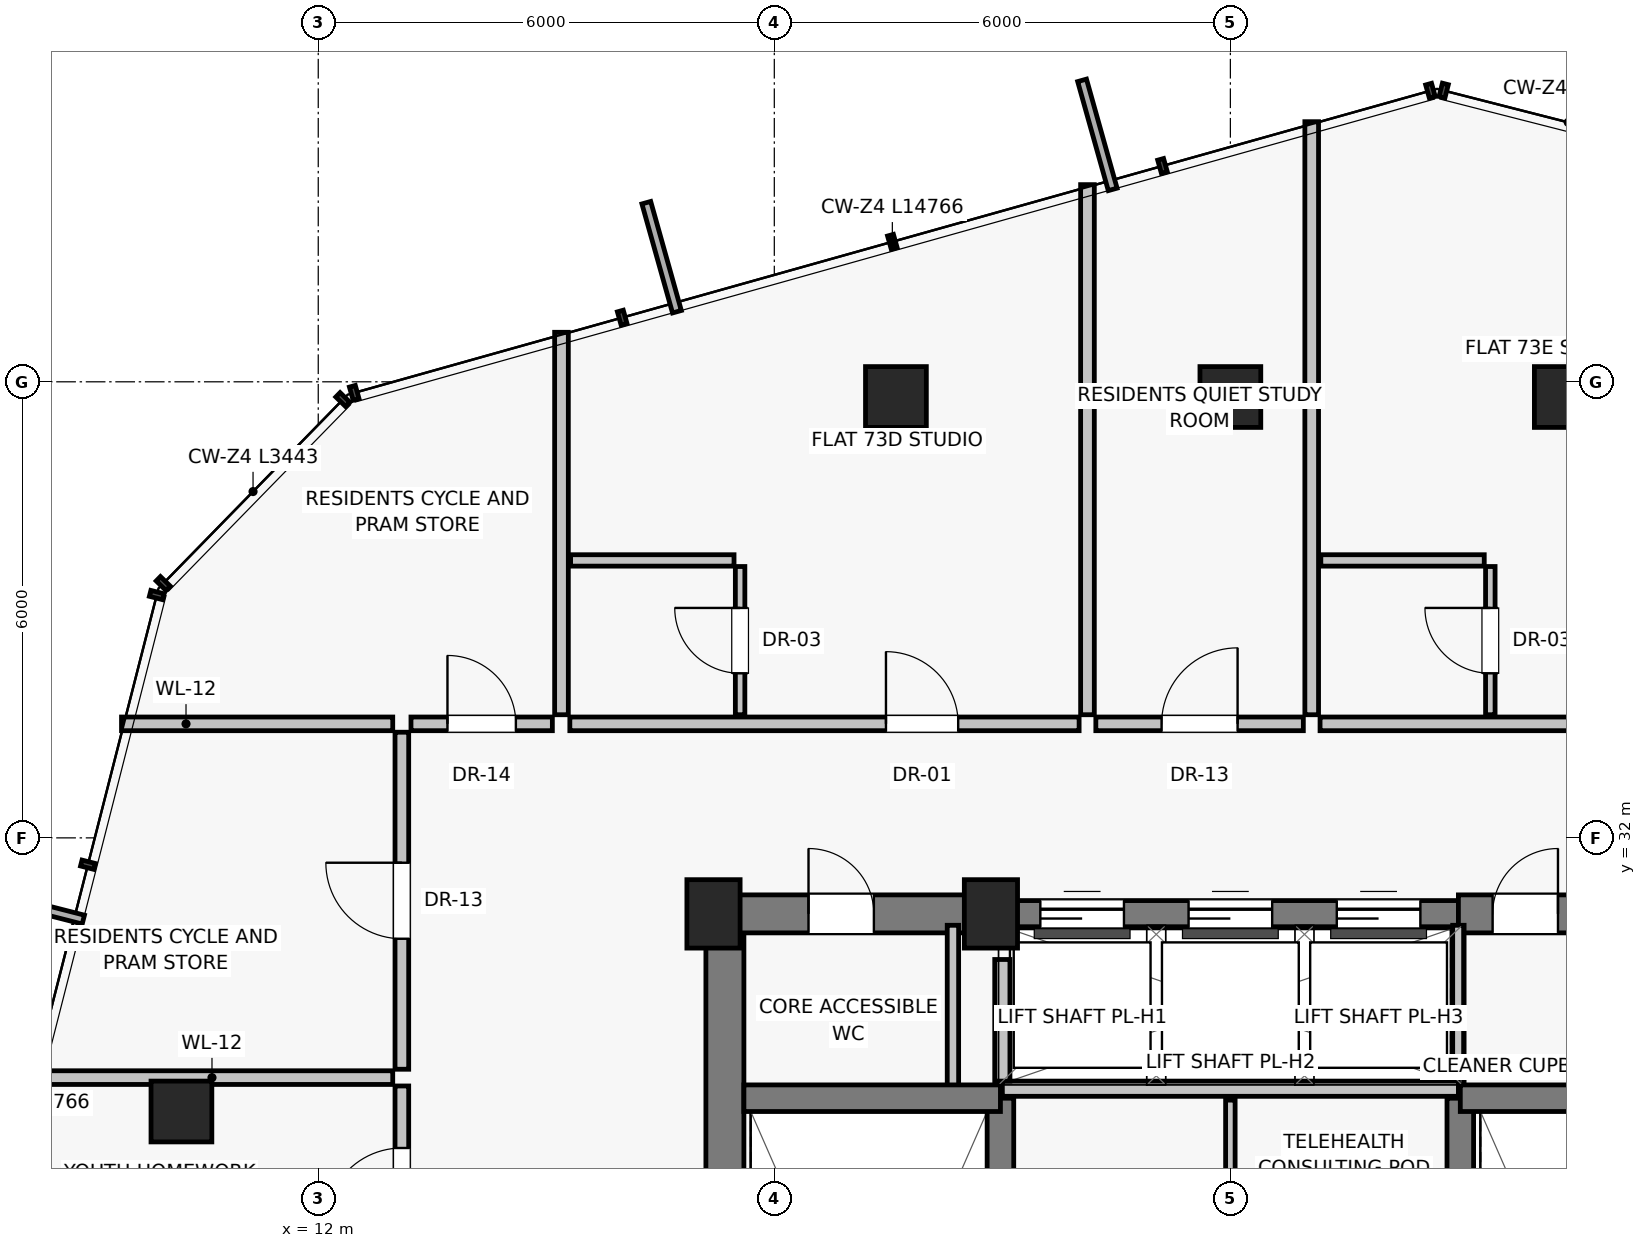
"""IFC4 building model, lengths in metres.
Left out: names, types, materials, properties, quantities, classifications, styles, units other than length and angle.
Written with IfcOpenShell. Run it as: python <this file> out.ifc"""

import sys

from ifc_helpers import new_model, si_unit, direction, frame, frame_2d, origin, origin_2d, place, context, subcontext, project, spatial, rectangle, extrude, source, transform, mapped, element, fill, save


model = new_model("IFC4")
c1 = context("Model", 3, precision=1e-05, world=origin(), true_north=direction((0.0, 1.0)))
c2 = subcontext(c1, "Body", "Model", "MODEL_VIEW")
j1 = project(units=[si_unit("LENGTHUNIT", "METRE"), si_unit("PLANEANGLEUNIT", "RADIAN")], contexts=[c1])
p1 = place(None, origin())
s1 = spatial("IfcSite", under=j1, at=p1, CompositionType="ELEMENT")
p2 = place(p1, origin())
s2 = spatial("IfcBuilding", under=s1, at=p2, CompositionType="ELEMENT")
p3 = place(p2, frame((0.0, 0.0, 257.75)))
s3 = spatial("IfcBuildingStorey", under=s2, at=p3, CompositionType="ELEMENT", Elevation=257.75)
for number, where, z_axis, x_axis in (
    (1, (17.2, 31.0, 0.0), (0.0, 0.0, 1.0), (1.0, 0.0, 0.0)),
    (2, (20.85, 31.0, 0.0), (0.0, 0.0, 1.0), (1.0, 0.0, 0.0)),
):
    element("IfcColumn", number, at=place(p3, frame(where, z_axis=z_axis, x_axis=x_axis)), inside=s3, PredefinedType="PILASTER", context=c2, shape_type="SweptSolid", body=[
        extrude(rectangle(XDim=0.7, YDim=0.9, at=origin_2d()), origin(), (0.0, 0.0, 1.0), 3.25),
    ])
for number, where, z_axis, x_axis in (
    (3, (28.4, 37.8, 0.0), (0.0, 0.0, 1.0), (1.0, 0.0, 0.0)),
    (4, (24.0, 37.8, 0.0), (0.0, 0.0, 1.0), (1.0, 0.0, 0.0)),
    (5, (19.6, 37.8, 0.0), (0.0, 0.0, 1.0), (1.0, 0.0, 0.0)),
    (6, (10.2, 28.4, 0.0), (0.0, 0.0, 1.0), (1.0, 0.0, 0.0)),
):
    element("IfcColumn", number, at=place(p3, frame(where, z_axis=z_axis, x_axis=x_axis)), inside=s3, PredefinedType="COLUMN", context=c2, shape_type="SweptSolid", body=[
        extrude(rectangle(XDim=0.8, YDim=0.8, at=origin_2d()), origin(), (0.0, 0.0, 1.0), 3.25),
    ])
p4 = place(p3, frame((17.35, 16.8, 0.0), z_axis=(0.0, 0.0, 1.0), x_axis=(0.0, 1.0, 0.0)))
e7 = element("IfcWall", 7, at=p4, inside=s3, PredefinedType="SHEAR", context=c2, shape_type="SweptSolid", body=[
    extrude(rectangle(XDim=14.2, YDim=0.5, at=frame_2d((7.1, 0.0))), origin(), (0.0, 0.0, 1.0), 3.015),
])
p5 = place(p3, frame((17.2, 31.0, 0.0), z_axis=(0.0, 0.0, 1.0), x_axis=(1.0, 0.0, 0.0)))
e8 = element("IfcWall", 8, at=p5, inside=s3, PredefinedType="SHEAR", context=c2, shape_type="SweptSolid", body=[
    extrude(rectangle(XDim=3.8, YDim=0.5, at=frame_2d((1.9, 0.0))), origin(), (0.0, 0.0, 1.0), 3.015),
])
p6 = place(p5, frame((1.25, 0.0, 0.0)))
e9 = element("IfcOpeningElement", 9, at=p6, cuts=e8, PredefinedType="OPENING", context=c2, shape_type="SweptSolid", body=[
    extrude(rectangle(XDim=0.86, YDim=2.01, at=frame_2d((0.43, 1.005))), frame((0.0, 0.26, 0.0), z_axis=(0.0, -1.0, 0.0), x_axis=(1.0, 0.0, 0.0)), (0.0, 0.0, 1.0), 0.52),
])
p7 = place(p3, frame((21.0, 31.0, 0.0), z_axis=(0.0, 0.0, 1.0), x_axis=(1.0, 0.0, 0.0)))
e10 = element("IfcWall", 10, at=p7, inside=s3, PredefinedType="SHEAR", context=c2, shape_type="SweptSolid", body=[
    extrude(rectangle(XDim=6.0, YDim=0.35, at=frame_2d((3.0, 0.0))), origin(), (0.0, 0.0, 1.0), 3.015),
])
p8 = place(p7, frame((0.5, 0.0, 0.0)))
e11 = element("IfcOpeningElement", 11, at=p8, cuts=e10, PredefinedType="OPENING", context=c2, shape_type="SweptSolid", body=[
    extrude(rectangle(XDim=1.1, YDim=2.08, at=frame_2d((0.55, 1.04))), frame((0.0, 0.185, 0.0), z_axis=(0.0, -1.0, 0.0), x_axis=(1.0, 0.0, 0.0)), (0.0, 0.0, 1.0), 0.37),
])
p9 = place(p7, frame((2.45, 0.0, 0.0)))
e12 = element("IfcOpeningElement", 12, at=p9, cuts=e10, PredefinedType="OPENING", context=c2, shape_type="SweptSolid", body=[
    extrude(rectangle(XDim=1.1, YDim=2.08, at=frame_2d((0.55, 1.04))), frame((0.0, 0.185, 0.0), z_axis=(0.0, -1.0, 0.0), x_axis=(1.0, 0.0, 0.0)), (0.0, 0.0, 1.0), 0.37),
])
p10 = place(p7, frame((4.4, 0.0, 0.0)))
e13 = element("IfcOpeningElement", 13, at=p10, cuts=e10, PredefinedType="OPENING", context=c2, shape_type="SweptSolid", body=[
    extrude(rectangle(XDim=1.1, YDim=2.08, at=frame_2d((0.55, 1.04))), frame((0.0, 0.185, 0.0), z_axis=(0.0, -1.0, 0.0), x_axis=(1.0, 0.0, 0.0)), (0.0, 0.0, 1.0), 0.37),
])
p11 = place(p3, frame((27.0, 31.0, 0.0), z_axis=(0.0, 0.0, 1.0), x_axis=(1.0, 0.0, 0.0)))
e14 = element("IfcWall", 14, at=p11, inside=s3, PredefinedType="SHEAR", context=c2, shape_type="SweptSolid", body=[
    extrude(rectangle(XDim=3.8, YDim=0.5, at=frame_2d((1.9, 0.0))), origin(), (0.0, 0.0, 1.0), 3.015),
])
p12 = place(p11, frame((0.45, 0.0, 0.0)))
e15 = element("IfcOpeningElement", 15, at=p12, cuts=e14, PredefinedType="OPENING", context=c2, shape_type="SweptSolid", body=[
    extrude(rectangle(XDim=0.86, YDim=2.01, at=frame_2d((0.43, 1.005))), frame((0.0, 0.26, 0.0), z_axis=(0.0, -1.0, 0.0), x_axis=(1.0, 0.0, 0.0)), (0.0, 0.0, 1.0), 0.52),
])
p13 = place(p11, frame((1.9, 0.0, 0.0)))
e16 = element("IfcOpeningElement", 16, at=p13, cuts=e14, PredefinedType="OPENING", context=c2, shape_type="SweptSolid", body=[
    extrude(rectangle(XDim=0.86, YDim=2.01, at=frame_2d((0.43, 1.005))), frame((0.0, 0.26, 0.0), z_axis=(0.0, -1.0, 0.0), x_axis=(1.0, 0.0, 0.0)), (0.0, 0.0, 1.0), 0.52),
])
for number, where, z_axis, x_axis in (
    (17, (20.35, 28.65, 0.0), (0.0, 0.0, 1.0), (0.0, 1.0, 0.0)),
    (18, (27.0, 28.65, 0.0), (0.0, 0.0, 1.0), (0.0, 1.0, 0.0)),
):
    element("IfcWall", number, at=place(p3, frame(where, z_axis=z_axis, x_axis=x_axis)), inside=s3, PredefinedType="PARTITIONING", context=c2, shape_type="SweptSolid", body=[
        extrude(rectangle(XDim=2.2, YDim=0.15, at=frame_2d((1.1, 0.0))), origin(), (0.0, 0.0, 1.0), 3.015),
    ])
for number, where, z_axis, x_axis in (
    (19, (20.975, 19.8, 0.0), (0.0, 0.0, 1.0), (0.0, 1.0, 0.0)),
    (20, (27.025, 19.8, 0.0), (0.0, 0.0, 1.0), (0.0, 1.0, 0.0)),
):
    element("IfcWall", number, at=place(p3, frame(where, z_axis=z_axis, x_axis=x_axis)), inside=s3, PredefinedType="SHEAR", context=c2, shape_type="SweptSolid", body=[
        extrude(rectangle(XDim=8.775, YDim=0.35, at=frame_2d((4.387, 0.0))), origin(), (0.0, 0.0, 1.0), 3.015),
    ])
for number, where, z_axis, x_axis in (
    (21, (17.6, 28.575, 0.0), (0.0, 0.0, 1.0), (1.0, 0.0, 0.0)),
    (22, (27.025, 28.575, 0.0), (0.0, 0.0, 1.0), (1.0, 0.0, 0.0)),
):
    element("IfcWall", number, at=place(p3, frame(where, z_axis=z_axis, x_axis=x_axis)), inside=s3, PredefinedType="SHEAR", context=c2, shape_type="SweptSolid", body=[
        extrude(rectangle(XDim=3.375, YDim=0.35, at=frame_2d((1.688, 0.0))), origin(), (0.0, 0.0, 1.0), 3.015),
    ])
p14 = place(p3, frame((21.0, 28.7, 0.0), z_axis=(0.0, 0.0, 1.0), x_axis=(1.0, 0.0, 0.0)))
e23 = element("IfcWall", 23, at=p14, inside=s3, PredefinedType="SOLIDWALL", context=c2, shape_type="SweptSolid", body=[
    extrude(rectangle(XDim=6.0, YDim=0.2, at=frame_2d((3.0, 0.0))), origin(), (0.0, 0.0, 1.0), 3.015),
])
p15 = place(p3, frame((21.0, 28.8, 0.0), z_axis=(0.0, 0.0, 1.0), x_axis=(0.0, 1.0, 0.0)))
e24 = element("IfcWall", 24, at=p15, inside=s3, PredefinedType="SOLIDWALL", context=c2, shape_type="SweptSolid", body=[
    extrude(rectangle(XDim=1.6, YDim=0.2, at=frame_2d((0.8, 0.0))), origin(), (0.0, 0.0, 1.0), 3.015),
])
p16 = place(p3, frame((24.0, 24.2, 0.0), z_axis=(0.0, 0.0, 1.0), x_axis=(0.0, 1.0, 0.0)))
e25 = element("IfcWall", 25, at=p16, inside=s3, PredefinedType="PARTITIONING", context=c2, shape_type="SweptSolid", body=[
    extrude(rectangle(XDim=4.35, YDim=0.125, at=frame_2d((2.175, 0.0))), origin(), (0.0, 0.0, 1.0), 3.015),
])
p17 = place(p16, frame((1.6, 0.0, 0.0)))
e26 = element("IfcOpeningElement", 26, at=p17, cuts=e25, PredefinedType="OPENING", context=c2, shape_type="SweptSolid", body=[
    extrude(rectangle(XDim=0.9, YDim=2.01, at=frame_2d((0.45, 1.005))), frame((0.0, 0.073, 0.0), z_axis=(0.0, -1.0, 0.0), x_axis=(1.0, 0.0, 0.0)), (0.0, 0.0, 1.0), 0.145),
])
p18 = place(p3, frame((15.2, 33.62, 0.0), z_axis=(0.0, 0.0, 1.0), x_axis=(0.0, 1.0, 0.0)))
e27 = element("IfcWall", 27, at=p18, inside=s3, PredefinedType="PARTITIONING", context=c2, shape_type="SweptSolid", body=[
    extrude(rectangle(XDim=5.031, YDim=0.18, at=frame_2d((2.516, 0.0))), origin(), (0.0, 0.0, 1.0), 3.015),
])
p19 = place(p3, frame((22.23, 33.5, 0.0), z_axis=(0.0, 0.0, 1.0), x_axis=(1.0, 0.0, 0.0)))
e28 = element("IfcWall", 28, at=p19, inside=s3, PredefinedType="PARTITIONING", context=c2, shape_type="SweptSolid", body=[
    extrude(rectangle(XDim=2.73, YDim=0.18, at=frame_2d((1.365, 0.0))), origin(), (0.0, 0.0, 1.0), 3.015),
])
p20 = place(p19, frame((0.865, 0.0, 0.0)))
e29 = element("IfcOpeningElement", 29, at=p20, cuts=e28, PredefinedType="OPENING", context=c2, shape_type="SweptSolid", body=[
    extrude(rectangle(XDim=1.0, YDim=2.01, at=frame_2d((0.5, 1.005))), frame((0.0, 0.1, 0.0), z_axis=(0.0, -1.0, 0.0), x_axis=(1.0, 0.0, 0.0)), (0.0, 0.0, 1.0), 0.2),
])
p21 = place(p3, frame((22.12, 33.62, 0.0), z_axis=(0.0, 0.0, 1.0), x_axis=(0.0, 1.0, 0.0)))
e30 = element("IfcWall", 30, at=p21, inside=s3, PredefinedType="PARTITIONING", context=c2, shape_type="SweptSolid", body=[
    extrude(rectangle(XDim=6.974, YDim=0.18, at=frame_2d((3.487, 0.0))), origin(), (0.0, 0.0, 1.0), 3.015),
])
p22 = place(p3, frame((15.31, 33.5, 0.0), z_axis=(0.0, 0.0, 1.0), x_axis=(1.0, 0.0, 0.0)))
e31 = element("IfcWall", 31, at=p22, inside=s3, PredefinedType="PARTITIONING", context=c2, shape_type="SweptSolid", body=[
    extrude(rectangle(XDim=6.7, YDim=0.18, at=frame_2d((3.35, 0.0))), origin(), (0.0, 0.0, 1.0), 3.015),
])
p23 = place(p22, frame((4.159, 0.0, 0.0)))
e32 = element("IfcOpeningElement", 32, at=p23, cuts=e31, PredefinedType="OPENING", context=c2, shape_type="SweptSolid", body=[
    extrude(rectangle(XDim=0.95, YDim=2.02, at=frame_2d((0.475, 1.01))), frame((0.0, 0.1, 0.0), z_axis=(0.0, -1.0, 0.0), x_axis=(1.0, 0.0, 0.0)), (0.0, 0.0, 1.0), 0.2),
])
p24 = place(p3, frame((17.55, 33.62, 0.0), z_axis=(0.0, 0.0, 1.0), x_axis=(0.0, 1.0, 0.0)))
e33 = element("IfcWall", 33, at=p24, inside=s3, PredefinedType="PARTITIONING", context=c2, shape_type="SweptSolid", body=[
    extrude(rectangle(XDim=1.95, YDim=0.125, at=frame_2d((0.975, 0.0))), origin(), (0.0, 0.0, 1.0), 3.015),
])
p25 = place(p24, frame((0.545, 0.0, 0.0)))
e34 = element("IfcOpeningElement", 34, at=p25, cuts=e33, PredefinedType="OPENING", context=c2, shape_type="SweptSolid", body=[
    extrude(rectangle(XDim=0.86, YDim=2.01, at=frame_2d((0.43, 1.005))), frame((0.0, 0.073, 0.0), z_axis=(0.0, -1.0, 0.0), x_axis=(1.0, 0.0, 0.0)), (0.0, 0.0, 1.0), 0.145),
])
p26 = place(p3, frame((15.32, 35.65, 0.0), z_axis=(0.0, 0.0, 1.0), x_axis=(1.0, 0.0, 0.0)))
e35 = element("IfcWall", 35, at=p26, inside=s3, PredefinedType="PARTITIONING", context=c2, shape_type="SweptSolid", body=[
    extrude(rectangle(XDim=2.15, YDim=0.15, at=frame_2d((1.075, 0.0))), origin(), (0.0, 0.0, 1.0), 3.015),
])
p27 = place(p3, frame((25.07, 33.62, 0.0), z_axis=(0.0, 0.0, 1.0), x_axis=(0.0, 1.0, 0.0)))
e36 = element("IfcWall", 36, at=p27, inside=s3, PredefinedType="PARTITIONING", context=c2, shape_type="SweptSolid", body=[
    extrude(rectangle(XDim=7.802, YDim=0.18, at=frame_2d((3.901, 0.0))), origin(), (0.0, 0.0, 1.0), 3.015),
])
p28 = place(p3, frame((25.18, 33.5, 0.0), z_axis=(0.0, 0.0, 1.0), x_axis=(1.0, 0.0, 0.0)))
e37 = element("IfcWall", 37, at=p28, inside=s3, PredefinedType="PARTITIONING", context=c2, shape_type="SweptSolid", body=[
    extrude(rectangle(XDim=5.91, YDim=0.18, at=frame_2d((2.955, 0.0))), origin(), (0.0, 0.0, 1.0), 3.015),
])
p29 = place(p28, frame((3.574, 0.0, 0.0)))
e38 = element("IfcOpeningElement", 38, at=p29, cuts=e37, PredefinedType="OPENING", context=c2, shape_type="SweptSolid", body=[
    extrude(rectangle(XDim=0.95, YDim=2.02, at=frame_2d((0.475, 1.01))), frame((0.0, 0.1, 0.0), z_axis=(0.0, -1.0, 0.0), x_axis=(1.0, 0.0, 0.0)), (0.0, 0.0, 1.0), 0.2),
])
p30 = place(p3, frame((27.42, 33.62, 0.0), z_axis=(0.0, 0.0, 1.0), x_axis=(0.0, 1.0, 0.0)))
e39 = element("IfcWall", 39, at=p30, inside=s3, PredefinedType="PARTITIONING", context=c2, shape_type="SweptSolid", body=[
    extrude(rectangle(XDim=1.95, YDim=0.125, at=frame_2d((0.975, 0.0))), origin(), (0.0, 0.0, 1.0), 3.015),
])
p31 = place(p30, frame((0.545, 0.0, 0.0)))
e40 = element("IfcOpeningElement", 40, at=p31, cuts=e39, PredefinedType="OPENING", context=c2, shape_type="SweptSolid", body=[
    extrude(rectangle(XDim=0.86, YDim=2.01, at=frame_2d((0.43, 1.005))), frame((0.0, 0.073, 0.0), z_axis=(0.0, -1.0, 0.0), x_axis=(1.0, 0.0, 0.0)), (0.0, 0.0, 1.0), 0.145),
])
p32 = place(p3, frame((25.19, 35.65, 0.0), z_axis=(0.0, 0.0, 1.0), x_axis=(1.0, 0.0, 0.0)))
e41 = element("IfcWall", 41, at=p32, inside=s3, PredefinedType="PARTITIONING", context=c2, shape_type="SweptSolid", body=[
    extrude(rectangle(XDim=2.15, YDim=0.15, at=frame_2d((1.075, 0.0))), origin(), (0.0, 0.0, 1.0), 3.015),
])
p33 = place(p3, frame((12.98, 33.5, 0.0), z_axis=(0.0, 0.0, 1.0), x_axis=(-1.0, 0.0, 0.0)))
e42 = element("IfcWall", 42, at=p33, inside=s3, PredefinedType="PARTITIONING", context=c2, shape_type="SweptSolid", body=[
    extrude(rectangle(XDim=3.568, YDim=0.18, at=frame_2d((1.784, 0.0))), origin(), (0.0, 0.0, 1.0), 3.015),
])
p34 = place(p3, frame((13.1, 26.104, 0.0), z_axis=(0.0, 0.0, 1.0), x_axis=(0.0, 1.0, 0.0)))
e43 = element("IfcWall", 43, at=p34, inside=s3, PredefinedType="PARTITIONING", context=c2, shape_type="SweptSolid", body=[
    extrude(rectangle(XDim=2.632, YDim=0.18, at=frame_2d((1.316, 0.0))), origin(), (0.0, 0.0, 1.0), 2.662),
])
p35 = place(p34, frame((0.816, 0.0, 0.0)))
e44 = element("IfcOpeningElement", 44, at=p35, cuts=e43, PredefinedType="OPENING", context=c2, shape_type="SweptSolid", body=[
    extrude(rectangle(XDim=1.0, YDim=2.01, at=frame_2d((0.5, 1.005))), frame((0.0, 0.1, 0.0), z_axis=(0.0, -1.0, 0.0), x_axis=(1.0, 0.0, 0.0)), (0.0, 0.0, 1.0), 0.2),
])
p36 = place(p3, frame((13.1, 28.956, 0.0), z_axis=(0.0, 0.0, 1.0), x_axis=(0.0, 1.0, 0.0)))
e45 = element("IfcWall", 45, at=p36, inside=s3, PredefinedType="PARTITIONING", context=c2, shape_type="SweptSolid", body=[
    extrude(rectangle(XDim=4.434, YDim=0.18, at=frame_2d((2.217, 0.0))), origin(), (0.0, 0.0, 1.0), 2.662),
])
p37 = place(p36, frame((1.717, 0.0, 0.0)))
e46 = element("IfcOpeningElement", 46, at=p37, cuts=e45, PredefinedType="OPENING", context=c2, shape_type="SweptSolid", body=[
    extrude(rectangle(XDim=1.0, YDim=2.01, at=frame_2d((0.5, 1.005))), frame((0.0, 0.1, 0.0), z_axis=(0.0, -1.0, 0.0), x_axis=(1.0, 0.0, 0.0)), (0.0, 0.0, 1.0), 0.2),
])
p38 = place(p3, frame((12.98, 28.846, 0.0), z_axis=(0.0, 0.0, 1.0), x_axis=(-1.0, 0.0, 0.0)))
e47 = element("IfcWall", 47, at=p38, inside=s3, PredefinedType="PARTITIONING", context=c2, shape_type="SweptSolid", body=[
    extrude(rectangle(XDim=4.756, YDim=0.18, at=frame_2d((2.378, 0.0))), origin(), (0.0, 0.0, 1.0), 3.015),
])
p39 = place(p3, frame((13.22, 33.5, 0.0), z_axis=(0.0, 0.0, 1.0), x_axis=(1.0, 0.0, 0.0)))
e48 = element("IfcWall", 48, at=p39, inside=s3, PredefinedType="PARTITIONING", context=c2, shape_type="SweptSolid", body=[
    extrude(rectangle(XDim=1.86, YDim=0.18, at=frame_2d((0.93, 0.0))), origin(), (0.0, 0.0, 1.0), 3.015),
])
p40 = place(p39, frame((0.48, 0.0, 0.0)))
e49 = element("IfcOpeningElement", 49, at=p40, cuts=e48, PredefinedType="OPENING", context=c2, shape_type="SweptSolid", body=[
    extrude(rectangle(XDim=0.9, YDim=2.01, at=frame_2d((0.45, 1.005))), frame((0.0, 0.1, 0.0), z_axis=(0.0, -1.0, 0.0), x_axis=(1.0, 0.0, 0.0)), (0.0, 0.0, 1.0), 0.2),
])
m1 = source(origin(), c2, "Body", "SweptSolid", [
    extrude(rectangle(XDim=0.86, YDim=2.01, at=frame_2d((0.43, 1.005))), frame((0.0, 0.025, 0.0), z_axis=(0.0, -1.0, 0.0), x_axis=(1.0, 0.0, 0.0)), (0.0, 0.0, 1.0), 0.05),
])
p41 = place(p6, origin())
e50 = element("IfcDoor", 50, at=p41, inside=s3, OperationType="SINGLE_SWING_LEFT", PredefinedType="DOOR", context=c2, shape_type="MappedRepresentation", body=[
    mapped(m1, transform((0.0, 0.0, 0.0), scale=1.0)),
])
fill(e9, e50)
m2 = source(origin(), c2, "Body", "SweptSolid", [
    extrude(rectangle(XDim=1.1, YDim=2.08, at=frame_2d((0.55, 1.04))), frame((0.0, 0.025, 0.0), z_axis=(0.0, -1.0, 0.0), x_axis=(1.0, 0.0, 0.0)), (0.0, 0.0, 1.0), 0.05),
])
p42 = place(p8, origin())
e51 = element("IfcDoor", 51, at=p42, inside=s3, OperationType="SLIDING_TO_LEFT", PredefinedType="DOOR", context=c2, shape_type="MappedRepresentation", body=[
    mapped(m2, transform((0.0, 0.0, 0.0), scale=1.0)),
])
fill(e11, e51)
p43 = place(p9, origin())
e52 = element("IfcDoor", 52, at=p43, inside=s3, OperationType="SLIDING_TO_LEFT", PredefinedType="DOOR", context=c2, shape_type="MappedRepresentation", body=[
    mapped(m2, transform((0.0, 0.0, 0.0), scale=1.0)),
])
fill(e12, e52)
p44 = place(p10, origin())
e53 = element("IfcDoor", 53, at=p44, inside=s3, OperationType="SLIDING_TO_LEFT", PredefinedType="DOOR", context=c2, shape_type="MappedRepresentation", body=[
    mapped(m2, transform((0.0, 0.0, 0.0), scale=1.0)),
])
fill(e13, e53)
p45 = place(p12, origin())
e54 = element("IfcDoor", 54, at=p45, inside=s3, OperationType="SINGLE_SWING_RIGHT", PredefinedType="DOOR", context=c2, shape_type="MappedRepresentation", body=[
    mapped(m1, transform((0.0, 0.0, 0.0), scale=1.0)),
])
fill(e15, e54)
m3 = source(origin(), c2, "Body", "SweptSolid", [
    extrude(rectangle(XDim=1.0, YDim=2.01, at=frame_2d((0.5, 1.005))), frame((0.0, 0.025, 0.0), z_axis=(0.0, -1.0, 0.0), x_axis=(1.0, 0.0, 0.0)), (0.0, 0.0, 1.0), 0.05),
])
p46 = place(p20, origin())
e55 = element("IfcDoor", 55, at=p46, inside=s3, OperationType="SINGLE_SWING_RIGHT", PredefinedType="DOOR", context=c2, shape_type="MappedRepresentation", body=[
    mapped(m3, transform((0.0, 0.0, 0.0), scale=1.0)),
])
fill(e29, e55)
m4 = source(origin(), c2, "Body", "SweptSolid", [
    extrude(rectangle(XDim=0.95, YDim=2.02, at=frame_2d((0.475, 1.01))), frame((0.0, 0.025, 0.0), z_axis=(0.0, -1.0, 0.0), x_axis=(1.0, 0.0, 0.0)), (0.0, 0.0, 1.0), 0.05),
])
p47 = place(p23, origin())
e56 = element("IfcDoor", 56, at=p47, inside=s3, OperationType="SINGLE_SWING_LEFT", PredefinedType="DOOR", context=c2, shape_type="MappedRepresentation", body=[
    mapped(m4, transform((0.0, 0.0, 0.0), scale=1.0)),
])
fill(e32, e56)
p48 = place(p25, origin())
e57 = element("IfcDoor", 57, at=p48, inside=s3, OperationType="SINGLE_SWING_RIGHT", PredefinedType="DOOR", context=c2, shape_type="MappedRepresentation", body=[
    mapped(m1, transform((0.0, 0.0, 0.0), scale=1.0)),
])
fill(e34, e57)
p49 = place(p31, origin())
e58 = element("IfcDoor", 58, at=p49, inside=s3, OperationType="SINGLE_SWING_RIGHT", PredefinedType="DOOR", context=c2, shape_type="MappedRepresentation", body=[
    mapped(m1, transform((0.0, 0.0, 0.0), scale=1.0)),
])
fill(e40, e58)
p50 = place(p35, origin())
e59 = element("IfcDoor", 59, at=p50, inside=s3, OperationType="SINGLE_SWING_LEFT", PredefinedType="DOOR", context=c2, shape_type="MappedRepresentation", body=[
    mapped(m3, transform((0.0, 0.0, 0.0), scale=1.0)),
])
fill(e44, e59)
p51 = place(p37, origin())
e60 = element("IfcDoor", 60, at=p51, inside=s3, OperationType="SINGLE_SWING_RIGHT", PredefinedType="DOOR", context=c2, shape_type="MappedRepresentation", body=[
    mapped(m3, transform((0.0, 0.0, 0.0), scale=1.0)),
])
fill(e46, e60)
m5 = source(origin(), c2, "Body", "SweptSolid", [
    extrude(rectangle(XDim=0.9, YDim=2.01, at=frame_2d((0.45, 1.005))), frame((0.0, 0.025, 0.0), z_axis=(0.0, -1.0, 0.0), x_axis=(1.0, 0.0, 0.0)), (0.0, 0.0, 1.0), 0.05),
])
p52 = place(p40, origin())
e61 = element("IfcDoor", 61, at=p52, inside=s3, OperationType="SINGLE_SWING_LEFT", PredefinedType="DOOR", context=c2, shape_type="MappedRepresentation", body=[
    mapped(m5, transform((0.0, 0.0, 0.0), scale=1.0)),
])
fill(e49, e61)
save(model, sys.argv[1])
